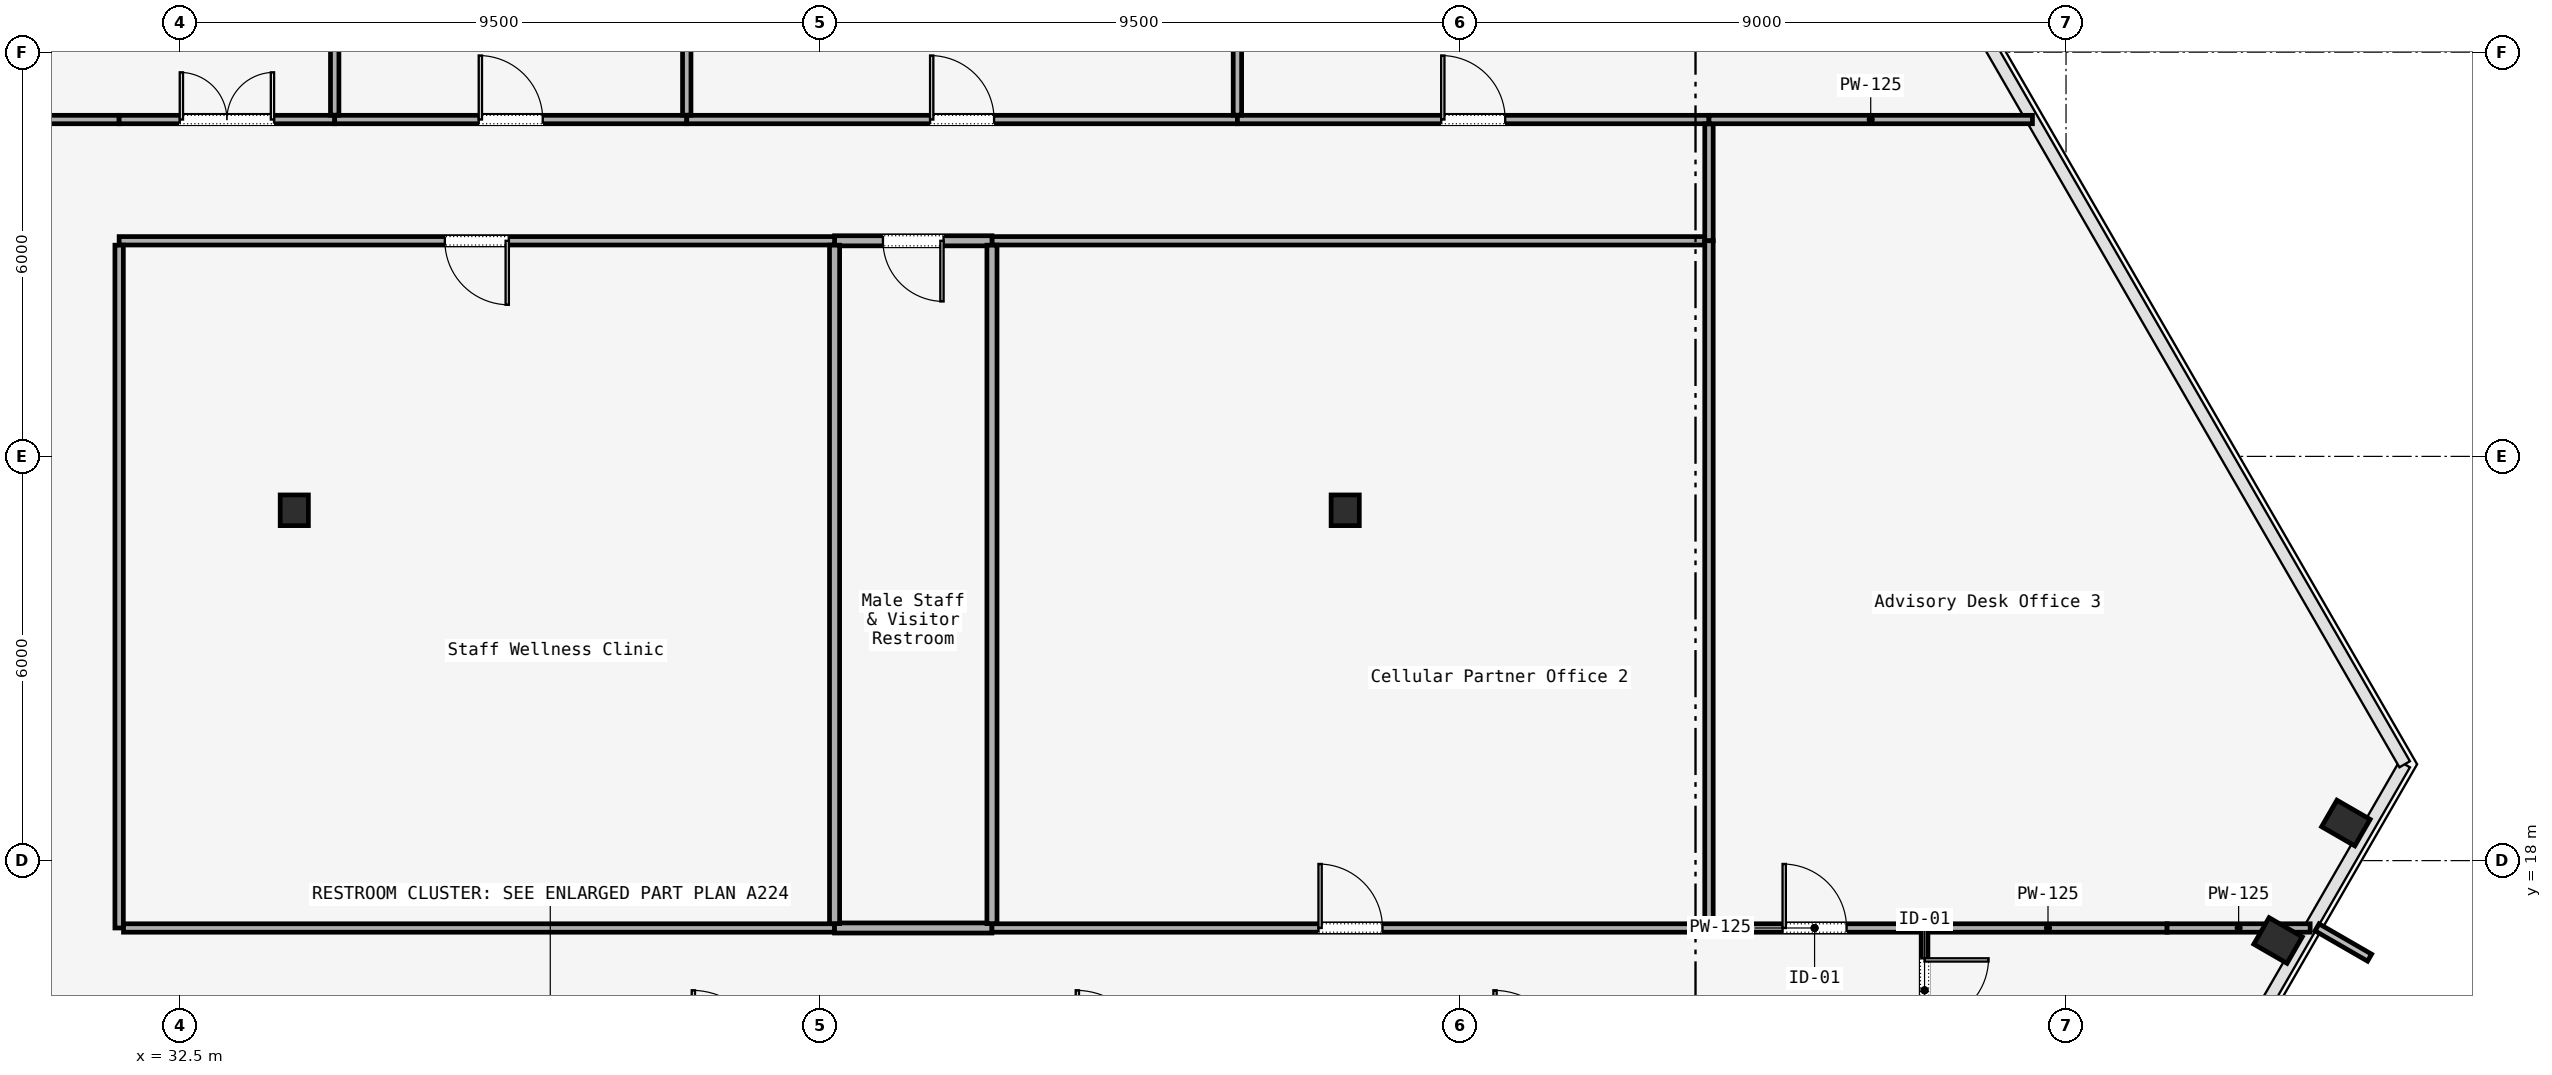
"""IFC4 building model, lengths in metres.
Left out: names, types, materials, properties, quantities, classifications, styles, units other than length and angle.
Written with IfcOpenShell. Run it as: python <this file> out.ifc"""

import sys

from ifc_helpers import new_model, si_unit, direction, frame, frame_2d, origin, origin_2d, place, context, subcontext, project, spatial, rectangle, i_section, extrude, element, fill, save


model = new_model("IFC4")
c1 = context("Model", 3, precision=1e-05, world=origin(), true_north=direction((0.0, 1.0)))
c2 = subcontext(c1, "Body", "Model", "MODEL_VIEW")
j1 = project(units=[si_unit("LENGTHUNIT", "METRE"), si_unit("PLANEANGLEUNIT", "RADIAN")], contexts=[c1])
p1 = place(None, origin())
s1 = spatial("IfcSite", under=j1, at=p1, CompositionType="ELEMENT")
p2 = place(p1, origin())
s2 = spatial("IfcBuilding", under=s1, at=p2, CompositionType="ELEMENT")
p3 = place(p2, frame((0.0, 0.0, 36.0)))
s3 = spatial("IfcBuildingStorey", under=s2, at=p3, CompositionType="ELEMENT", Elevation=36.0)
for number, where, z_axis, x_axis in (
    (1, (34.2, 23.2, 0.0), (0.0, 0.0, 1.0), (1.0, 0.0, 0.0)),
    (2, (49.8, 23.2, 0.0), (0.0, 0.0, 1.0), (1.0, 0.0, 0.0)),
):
    element("IfcColumn", number, at=place(p3, frame(where, z_axis=z_axis, x_axis=x_axis)), inside=s3, PredefinedType="COLUMN", context=c2, shape_type="SweptSolid", body=[
        extrude(i_section(OverallWidth=0.418, OverallDepth=0.456, WebThickness=0.042, FlangeThickness=0.067, FilletRadius=0.015, at=origin_2d()), origin(), (0.0, 0.0, 1.0), 3.58),
    ])
for number, where, z_axis, x_axis in (
    (3, (63.647, 16.814, 0.0), (0.0, 0.0, 1.0), (0.5, 0.866, 0.0)),
    (4, (64.654, 18.558, 0.0), (0.0, 0.0, 1.0), (0.5, 0.866, 0.0)),
):
    element("IfcColumn", number, at=place(p3, frame(where, z_axis=z_axis, x_axis=x_axis)), inside=s3, PredefinedType="COLUMN", context=c2, shape_type="SweptSolid", body=[
        extrude(i_section(OverallWidth=0.454, OverallDepth=0.569, WebThickness=0.078, FlangeThickness=0.08, FilletRadius=0.015, at=origin_2d()), origin(), (0.0, 0.0, 1.0), 3.58),
    ])
p4 = place(p3, frame((58.4, 17.0, 0.0), z_axis=(0.0, 0.0, 1.0), x_axis=(0.0, -1.0, 0.0)))
e5 = element("IfcWall", 5, at=p4, inside=s3, PredefinedType="MOVABLE", context=c2, shape_type="SweptSolid", body=[
    extrude(rectangle(XDim=1.85, YDim=0.1, at=frame_2d((0.925, 0.0))), origin(), (0.0, 0.0, 1.0), 2.933),
])
p5 = place(p4, frame((0.45, 0.0, 0.0)))
e6 = element("IfcOpeningElement", 6, at=p5, cuts=e5, PredefinedType="OPENING", context=c2, shape_type="SweptSolid", body=[
    extrude(rectangle(XDim=0.95, YDim=2.2, at=frame_2d((0.475, 1.1))), frame((0.0, 0.05, 0.0), z_axis=(0.0, -1.0, 0.0), x_axis=(1.0, 0.0, 0.0)), (0.0, 0.0, 1.0), 0.1),
])
p6 = place(p3, frame((29.865, 29.0, 0.0), z_axis=(0.0, 0.0, 1.0), x_axis=(1.0, 0.0, 0.0)))
e7 = element("IfcWall", 7, at=p6, inside=s3, PredefinedType="PARTITIONING", context=c2, shape_type="SweptSolid", body=[
    extrude(rectangle(XDim=1.735, YDim=0.125, at=frame_2d((0.868, 0.0))), origin(), (0.0, 0.0, 1.0), 2.933),
])
p7 = place(p3, frame((31.6, 29.0, 0.0), z_axis=(0.0, 0.0, 1.0), x_axis=(1.0, 0.0, 0.0)))
e8 = element("IfcWall", 8, at=p7, inside=s3, PredefinedType="PARTITIONING", context=c2, shape_type="SweptSolid", body=[
    extrude(rectangle(XDim=3.2, YDim=0.125, at=frame_2d((1.6, 0.0))), origin(), (0.0, 0.0, 1.0), 2.933),
])
p8 = place(p7, frame((0.9, 0.0, 0.0)))
e9 = element("IfcOpeningElement", 9, at=p8, cuts=e8, PredefinedType="OPENING", context=c2, shape_type="SweptSolid", body=[
    extrude(rectangle(XDim=1.4, YDim=2.2, at=frame_2d((0.7, 1.1))), frame((0.0, 0.062, 0.0), z_axis=(0.0, -1.0, 0.0), x_axis=(1.0, 0.0, 0.0)), (0.0, 0.0, 1.0), 0.125),
])
p9 = place(p3, frame((34.8, 29.0, 0.0), z_axis=(0.0, 0.0, 1.0), x_axis=(1.0, 0.0, 0.0)))
e10 = element("IfcWall", 10, at=p9, inside=s3, PredefinedType="PARTITIONING", context=c2, shape_type="SweptSolid", body=[
    extrude(rectangle(XDim=5.226, YDim=0.125, at=frame_2d((2.613, 0.0))), origin(), (0.0, 0.0, 1.0), 2.933),
])
p10 = place(p9, frame((2.138, 0.0, 0.0)))
e11 = element("IfcOpeningElement", 11, at=p10, cuts=e10, PredefinedType="OPENING", context=c2, shape_type="SweptSolid", body=[
    extrude(rectangle(XDim=0.95, YDim=2.2, at=frame_2d((0.475, 1.1))), frame((0.0, 0.062, 0.0), z_axis=(0.0, -1.0, 0.0), x_axis=(1.0, 0.0, 0.0)), (0.0, 0.0, 1.0), 0.125),
])
p11 = place(p3, frame((40.026, 29.0, 0.0), z_axis=(0.0, 0.0, 1.0), x_axis=(1.0, 0.0, 0.0)))
e12 = element("IfcWall", 12, at=p11, inside=s3, PredefinedType="PARTITIONING", context=c2, shape_type="SweptSolid", body=[
    extrude(rectangle(XDim=8.174, YDim=0.125, at=frame_2d((4.087, 0.0))), origin(), (0.0, 0.0, 1.0), 2.933),
])
p12 = place(p11, frame((3.612, 0.0, 0.0)))
e13 = element("IfcOpeningElement", 13, at=p12, cuts=e12, PredefinedType="OPENING", context=c2, shape_type="SweptSolid", body=[
    extrude(rectangle(XDim=0.95, YDim=2.2, at=frame_2d((0.475, 1.1))), frame((0.0, 0.062, 0.0), z_axis=(0.0, -1.0, 0.0), x_axis=(1.0, 0.0, 0.0)), (0.0, 0.0, 1.0), 0.125),
])
p13 = place(p3, frame((48.2, 29.0, 0.0), z_axis=(0.0, 0.0, 1.0), x_axis=(1.0, 0.0, 0.0)))
e14 = element("IfcWall", 14, at=p13, inside=s3, PredefinedType="PARTITIONING", context=c2, shape_type="SweptSolid", body=[
    extrude(rectangle(XDim=7.0, YDim=0.125, at=frame_2d((3.5, 0.0))), origin(), (0.0, 0.0, 1.0), 2.933),
])
p14 = place(p13, frame((3.025, 0.0, 0.0)))
e15 = element("IfcOpeningElement", 15, at=p14, cuts=e14, PredefinedType="OPENING", context=c2, shape_type="SweptSolid", body=[
    extrude(rectangle(XDim=0.95, YDim=2.2, at=frame_2d((0.475, 1.1))), frame((0.0, 0.062, 0.0), z_axis=(0.0, -1.0, 0.0), x_axis=(1.0, 0.0, 0.0)), (0.0, 0.0, 1.0), 0.125),
])
p15 = place(p3, frame((55.2, 28.935, 0.0), z_axis=(0.0, 0.0, 1.0), x_axis=(0.0, -1.0, 0.0)))
e16 = element("IfcWall", 16, at=p15, inside=s3, PredefinedType="PARTITIONING", context=c2, shape_type="SweptSolid", body=[
    extrude(rectangle(XDim=1.735, YDim=0.125, at=frame_2d((0.868, 0.0))), origin(), (0.0, 0.0, 1.0), 2.933),
])
p16 = place(p3, frame((55.135, 27.2, 0.0), z_axis=(0.0, 0.0, 1.0), x_axis=(-1.0, 0.0, 0.0)))
e17 = element("IfcWall", 17, at=p16, inside=s3, PredefinedType="PARTITIONING", context=c2, shape_type="SweptSolid", body=[
    extrude(rectangle(XDim=10.579, YDim=0.125, at=frame_2d((5.289, 0.0))), origin(), (0.0, 0.0, 1.0), 2.933),
])
p17 = place(p3, frame((44.556, 27.2, 0.0), z_axis=(0.0, 0.0, 1.0), x_axis=(-1.0, 0.0, 0.0)))
e18 = element("IfcWall", 18, at=p17, inside=s3, PredefinedType="PARTITIONING", context=c2, shape_type="SweptSolid", body=[
    extrude(rectangle(XDim=2.336, YDim=0.15, at=frame_2d((1.168, 0.0))), origin(), (0.0, 0.0, 1.0), 2.933),
])
p18 = place(p17, frame((0.718, 0.0, 0.0)))
e19 = element("IfcOpeningElement", 19, at=p18, cuts=e18, PredefinedType="OPENING", context=c2, shape_type="SweptSolid", body=[
    extrude(rectangle(XDim=0.9, YDim=2.15, at=frame_2d((0.45, 1.075))), frame((0.0, 0.075, 0.0), z_axis=(0.0, -1.0, 0.0), x_axis=(1.0, 0.0, 0.0)), (0.0, 0.0, 1.0), 0.15),
])
p19 = place(p3, frame((42.22, 27.2, 0.0), z_axis=(0.0, 0.0, 1.0), x_axis=(-1.0, 0.0, 0.0)))
e20 = element("IfcWall", 20, at=p19, inside=s3, PredefinedType="PARTITIONING", context=c2, shape_type="SweptSolid", body=[
    extrude(rectangle(XDim=10.62, YDim=0.125, at=frame_2d((5.31, 0.0))), origin(), (0.0, 0.0, 1.0), 2.933),
])
p20 = place(p19, frame((4.835, 0.0, 0.0)))
e21 = element("IfcOpeningElement", 21, at=p20, cuts=e20, PredefinedType="OPENING", context=c2, shape_type="SweptSolid", body=[
    extrude(rectangle(XDim=0.95, YDim=2.2, at=frame_2d((0.475, 1.1))), frame((0.0, 0.062, 0.0), z_axis=(0.0, -1.0, 0.0), x_axis=(1.0, 0.0, 0.0)), (0.0, 0.0, 1.0), 0.125),
])
p21 = place(p3, frame((31.6, 27.135, 0.0), z_axis=(0.0, 0.0, 1.0), x_axis=(0.0, -1.0, 0.0)))
e22 = element("IfcWall", 22, at=p21, inside=s3, PredefinedType="PARTITIONING", context=c2, shape_type="SweptSolid", body=[
    extrude(rectangle(XDim=10.135, YDim=0.125, at=frame_2d((5.067, 0.0))), origin(), (0.0, 0.0, 1.0), 2.933),
])
p22 = place(p3, frame((31.665, 17.0, 0.0), z_axis=(0.0, 0.0, 1.0), x_axis=(1.0, 0.0, 0.0)))
e23 = element("IfcWall", 23, at=p22, inside=s3, PredefinedType="PARTITIONING", context=c2, shape_type="SweptSolid", body=[
    extrude(rectangle(XDim=10.555, YDim=0.125, at=frame_2d((5.277, 0.0))), origin(), (0.0, 0.0, 1.0), 2.933),
])
p23 = place(p3, frame((42.22, 17.0, 0.0), z_axis=(0.0, 0.0, 1.0), x_axis=(1.0, 0.0, 0.0)))
e24 = element("IfcWall", 24, at=p23, inside=s3, PredefinedType="PARTITIONING", context=c2, shape_type="SweptSolid", body=[
    extrude(rectangle(XDim=2.336, YDim=0.15, at=frame_2d((1.168, 0.0))), origin(), (0.0, 0.0, 1.0), 2.933),
])
p24 = place(p3, frame((44.556, 17.0, 0.0), z_axis=(0.0, 0.0, 1.0), x_axis=(1.0, 0.0, 0.0)))
e25 = element("IfcWall", 25, at=p24, inside=s3, PredefinedType="PARTITIONING", context=c2, shape_type="SweptSolid", body=[
    extrude(rectangle(XDim=10.644, YDim=0.125, at=frame_2d((5.322, 0.0))), origin(), (0.0, 0.0, 1.0), 2.933),
])
p25 = place(p24, frame((4.847, 0.0, 0.0)))
e26 = element("IfcOpeningElement", 26, at=p25, cuts=e25, PredefinedType="OPENING", context=c2, shape_type="SweptSolid", body=[
    extrude(rectangle(XDim=0.95, YDim=2.2, at=frame_2d((0.475, 1.1))), frame((0.0, 0.062, 0.0), z_axis=(0.0, -1.0, 0.0), x_axis=(1.0, 0.0, 0.0)), (0.0, 0.0, 1.0), 0.125),
])
p26 = place(p3, frame((55.2, 17.0, 0.0), z_axis=(0.0, 0.0, 1.0), x_axis=(1.0, 0.0, 0.0)))
e27 = element("IfcWall", 27, at=p26, inside=s3, PredefinedType="PARTITIONING", context=c2, shape_type="SweptSolid", body=[
    extrude(rectangle(XDim=3.135, YDim=0.125, at=frame_2d((1.567, 0.0))), origin(), (0.0, 0.0, 1.0), 2.933),
])
p27 = place(p26, frame((1.093, 0.0, 0.0)))
e28 = element("IfcOpeningElement", 28, at=p27, cuts=e27, PredefinedType="OPENING", context=c2, shape_type="SweptSolid", body=[
    extrude(rectangle(XDim=0.95, YDim=2.2, at=frame_2d((0.475, 1.1))), frame((0.0, 0.062, 0.0), z_axis=(0.0, -1.0, 0.0), x_axis=(1.0, 0.0, 0.0)), (0.0, 0.0, 1.0), 0.125),
])
p28 = place(p3, frame((58.465, 17.0, 0.0), z_axis=(0.0, 0.0, 1.0), x_axis=(1.0, 0.0, 0.0)))
e29 = element("IfcWall", 29, at=p28, inside=s3, PredefinedType="PARTITIONING", context=c2, shape_type="SweptSolid", body=[
    extrude(rectangle(XDim=3.535, YDim=0.125, at=frame_2d((1.768, 0.0))), origin(), (0.0, 0.0, 1.0), 2.933),
])
p29 = place(p3, frame((62.0, 17.0, 0.0), z_axis=(0.0, 0.0, 1.0), x_axis=(1.0, 0.0, 0.0)))
e30 = element("IfcWall", 30, at=p29, inside=s3, PredefinedType="PARTITIONING", context=c2, shape_type="SweptSolid", body=[
    extrude(rectangle(XDim=2.124, YDim=0.125, at=frame_2d((1.062, 0.0))), origin(), (0.0, 0.0, 1.0), 2.933),
])
for number, where, z_axis, x_axis in (
    (31, (42.22, 27.135, 0.0), (0.0, 0.0, 1.0), (0.0, -1.0, 0.0)),
    (32, (44.556, 27.135, 0.0), (0.0, 0.0, 1.0), (0.0, -1.0, 0.0)),
):
    element("IfcWall", number, at=place(p3, frame(where, z_axis=z_axis, x_axis=x_axis)), inside=s3, PredefinedType="PARTITIONING", context=c2, shape_type="SweptSolid", body=[
        extrude(rectangle(XDim=10.07, YDim=0.15, at=frame_2d((5.035, 0.0))), origin(), (0.0, 0.0, 1.0), 2.933),
    ])
p30 = place(p3, frame((55.2, 27.2, 0.0), z_axis=(0.0, 0.0, 1.0), x_axis=(0.0, -1.0, 0.0)))
e33 = element("IfcWall", 33, at=p30, inside=s3, PredefinedType="PARTITIONING", context=c2, shape_type="SweptSolid", body=[
    extrude(rectangle(XDim=10.135, YDim=0.125, at=frame_2d((5.067, 0.0))), origin(), (0.0, 0.0, 1.0), 2.933),
])
p31 = place(p3, frame((55.2, 29.0, 0.0), z_axis=(0.0, 0.0, 1.0), x_axis=(1.0, 0.0, 0.0)))
e34 = element("IfcWall", 34, at=p31, inside=s3, PredefinedType="PARTITIONING", context=c2, shape_type="SweptSolid", body=[
    extrude(rectangle(XDim=4.802, YDim=0.125, at=frame_2d((2.401, 0.0))), origin(), (0.0, 0.0, 1.0), 2.933),
])
for number, where, z_axis, x_axis in (
    (35, (34.8, 45.91, 0.0), (0.0, 0.0, 1.0), (0.0, -1.0, 0.0)),
    (36, (48.2, 29.065, 0.0), (0.0, 0.0, 1.0), (0.0, 1.0, 0.0)),
    (37, (40.026, 29.065, 0.0), (0.0, 0.0, 1.0), (0.0, 1.0, 0.0)),
):
    element("IfcWall", number, at=place(p3, frame(where, z_axis=z_axis, x_axis=x_axis)), inside=s3, PredefinedType="PARTITIONING", context=c2, shape_type="SweptSolid", body=[
        extrude(rectangle(XDim=16.845, YDim=0.125, at=frame_2d((8.422, 0.0))), origin(), (0.0, 0.0, 1.0), 2.933),
    ])
p32 = place(p5, origin())
e38 = element("IfcDoor", 38, at=p32, inside=s3, OperationType="SINGLE_SWING_RIGHT", PredefinedType="DOOR", context=c2, shape_type="SweptSolid", body=[
    extrude(rectangle(XDim=0.95, YDim=2.2, at=frame_2d((0.475, 1.1))), frame((0.0, 0.025, 0.0), z_axis=(0.0, -1.0, 0.0), x_axis=(1.0, 0.0, 0.0)), (0.0, 0.0, 1.0), 0.05),
])
fill(e6, e38)
p33 = place(p20, origin())
e39 = element("IfcDoor", 39, at=p33, inside=s3, OperationType="SINGLE_SWING_RIGHT", PredefinedType="DOOR", context=c2, shape_type="SweptSolid", body=[
    extrude(rectangle(XDim=0.95, YDim=2.2, at=frame_2d((0.475, 1.1))), frame((0.0, 0.025, 0.0), z_axis=(0.0, -1.0, 0.0), x_axis=(1.0, 0.0, 0.0)), (0.0, 0.0, 1.0), 0.05),
])
fill(e21, e39)
p34 = place(p18, origin())
e40 = element("IfcDoor", 40, at=p34, inside=s3, OperationType="SINGLE_SWING_LEFT", PredefinedType="DOOR", context=c2, shape_type="SweptSolid", body=[
    extrude(rectangle(XDim=0.9, YDim=2.15, at=frame_2d((0.45, 1.075))), frame((0.0, 0.025, 0.0), z_axis=(0.0, -1.0, 0.0), x_axis=(1.0, 0.0, 0.0)), (0.0, 0.0, 1.0), 0.05),
])
fill(e19, e40)
p35 = place(p25, origin())
e41 = element("IfcDoor", 41, at=p35, inside=s3, OperationType="SINGLE_SWING_RIGHT", PredefinedType="DOOR", context=c2, shape_type="SweptSolid", body=[
    extrude(rectangle(XDim=0.95, YDim=2.2, at=frame_2d((0.475, 1.1))), frame((0.0, 0.025, 0.0), z_axis=(0.0, -1.0, 0.0), x_axis=(1.0, 0.0, 0.0)), (0.0, 0.0, 1.0), 0.05),
])
fill(e26, e41)
p36 = place(p27, origin())
e42 = element("IfcDoor", 42, at=p36, inside=s3, OperationType="SINGLE_SWING_LEFT", PredefinedType="DOOR", context=c2, shape_type="SweptSolid", body=[
    extrude(rectangle(XDim=0.95, YDim=2.2, at=frame_2d((0.475, 1.1))), frame((0.0, 0.025, 0.0), z_axis=(0.0, -1.0, 0.0), x_axis=(1.0, 0.0, 0.0)), (0.0, 0.0, 1.0), 0.05),
])
fill(e28, e42)
p37 = place(p8, origin())
e43 = element("IfcDoor", 43, at=p37, inside=s3, OperationType="SINGLE_SWING_LEFT", PredefinedType="DOOR", context=c2, shape_type="SweptSolid", body=[
    extrude(rectangle(XDim=1.4, YDim=2.2, at=frame_2d((0.7, 1.1))), frame((0.0, 0.025, 0.0), z_axis=(0.0, -1.0, 0.0), x_axis=(1.0, 0.0, 0.0)), (0.0, 0.0, 1.0), 0.05),
])
fill(e9, e43)
p38 = place(p14, origin())
e44 = element("IfcDoor", 44, at=p38, inside=s3, OperationType="SINGLE_SWING_RIGHT", PredefinedType="DOOR", context=c2, shape_type="SweptSolid", body=[
    extrude(rectangle(XDim=0.95, YDim=2.2, at=frame_2d((0.475, 1.1))), frame((0.0, 0.025, 0.0), z_axis=(0.0, -1.0, 0.0), x_axis=(1.0, 0.0, 0.0)), (0.0, 0.0, 1.0), 0.05),
])
fill(e15, e44)
p39 = place(p12, origin())
e45 = element("IfcDoor", 45, at=p39, inside=s3, OperationType="SINGLE_SWING_LEFT", PredefinedType="DOOR", context=c2, shape_type="SweptSolid", body=[
    extrude(rectangle(XDim=0.95, YDim=2.2, at=frame_2d((0.475, 1.1))), frame((0.0, 0.025, 0.0), z_axis=(0.0, -1.0, 0.0), x_axis=(1.0, 0.0, 0.0)), (0.0, 0.0, 1.0), 0.05),
])
fill(e13, e45)
p40 = place(p10, origin())
e46 = element("IfcDoor", 46, at=p40, inside=s3, OperationType="SINGLE_SWING_RIGHT", PredefinedType="DOOR", context=c2, shape_type="SweptSolid", body=[
    extrude(rectangle(XDim=0.95, YDim=2.2, at=frame_2d((0.475, 1.1))), frame((0.0, 0.025, 0.0), z_axis=(0.0, -1.0, 0.0), x_axis=(1.0, 0.0, 0.0)), (0.0, 0.0, 1.0), 0.05),
])
fill(e11, e46)
save(model, sys.argv[1])
